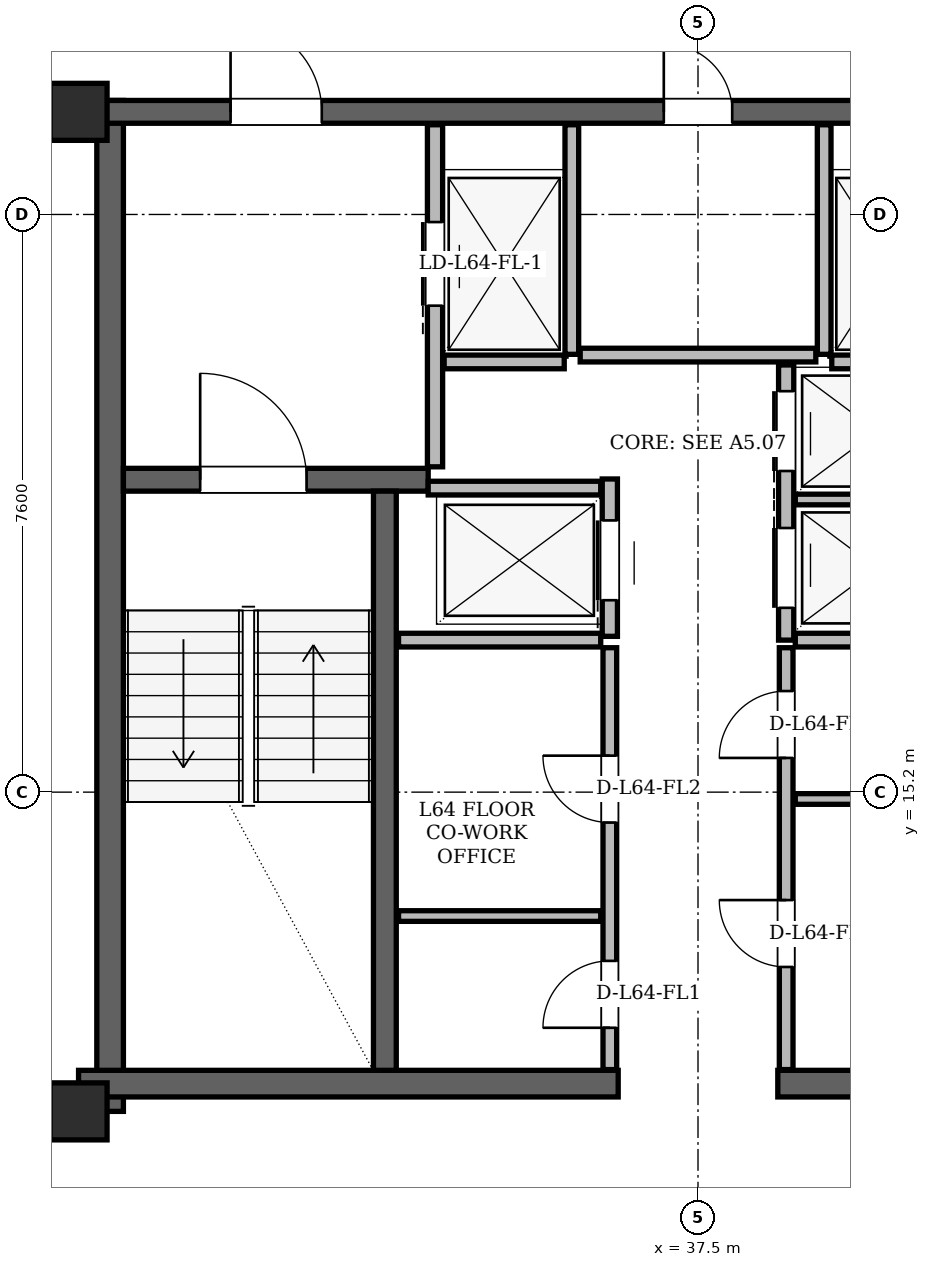
"""IFC4 building model, lengths in metres.
Left out: names, types, materials, properties, quantities, classifications, styles, units other than length and angle.
Written with IfcOpenShell. Run it as: python <this file> out.ifc"""

import sys

from ifc_helpers import new_model, si_unit, direction, frame, frame_2d, origin, origin_2d, place, context, subcontext, project, spatial, rectangle, hollow_rectangle, extrude, element, fill, save


model = new_model("IFC4")
c1 = context("Model", 3, precision=1e-05, world=origin(), true_north=direction((0.0, 1.0)))
c2 = subcontext(c1, "Body", "Model", "MODEL_VIEW")
j1 = project(units=[si_unit("LENGTHUNIT", "METRE"), si_unit("PLANEANGLEUNIT", "RADIAN")], contexts=[c1])
p1 = place(None, origin())
s1 = spatial("IfcSite", under=j1, at=p1, CompositionType="ELEMENT")
p2 = place(p1, origin())
s2 = spatial("IfcBuilding", under=s1, at=p2, CompositionType="ELEMENT")
p3 = place(p2, frame((0.0, 0.0, 241.5)))
s3 = spatial("IfcBuildingStorey", under=s2, at=p3, CompositionType="ELEMENT", Elevation=241.5)
for number, where, z_axis, x_axis in (
    (1, (29.35, 11.0, 0.0), (0.0, 0.0, 1.0), (1.0, 0.0, 0.0)),
    (2, (29.35, 24.15, 0.0), (0.0, 0.0, 1.0), (1.0, 0.0, 0.0)),
):
    element("IfcColumn", number, at=place(p3, frame(where, z_axis=z_axis, x_axis=x_axis)), inside=s3, PredefinedType="COLUMN", context=c2, shape_type="SweptSolid", body=[
        extrude(hollow_rectangle(XDim=0.75, YDim=0.75, WallThickness=0.06, at=origin_2d()), origin(), (0.0, 0.0, 1.0), 3.6),
    ])
p4 = place(p3, frame((29.765, 11.0, 0.0), z_axis=(0.0, 0.0, 1.0), x_axis=(0.0, 1.0, 0.0)))
e3 = element("IfcWall", 3, at=p4, inside=s3, PredefinedType="SHEAR", context=c2, shape_type="SweptSolid", body=[
    extrude(rectangle(XDim=13.3, YDim=0.35, at=frame_2d((6.65, 0.0))), origin(), (0.0, 0.0, 1.0), 3.34),
])
for number, where, z_axis, x_axis in (
    (4, (29.35, 11.365, 0.0), (0.0, 0.0, 1.0), (1.0, 0.0, 0.0)),
    (5, (38.55, 11.365, 0.0), (0.0, 0.0, 1.0), (1.0, 0.0, 0.0)),
):
    element("IfcWall", number, at=place(p3, frame(where, z_axis=z_axis, x_axis=x_axis)), inside=s3, PredefinedType="SHEAR", context=c2, shape_type="SweptSolid", body=[
        extrude(rectangle(XDim=7.1, YDim=0.35, at=frame_2d((3.55, 0.0))), origin(), (0.0, 0.0, 1.0), 3.34),
    ])
p5 = place(p3, frame((29.65, 24.15, 0.0), z_axis=(0.0, 0.0, 1.0), x_axis=(1.0, 0.0, 0.0)))
e6 = element("IfcWall", 6, at=p5, inside=s3, PredefinedType="SHEAR", context=c2, shape_type="SweptSolid", body=[
    extrude(rectangle(XDim=15.7, YDim=0.3, at=frame_2d((7.85, 0.0))), origin(), (0.0, 0.0, 1.0), 3.34),
])
p6 = place(p5, frame((1.7, 0.0, 0.0)))
e7 = element("IfcOpeningElement", 7, at=p6, cuts=e6, PredefinedType="OPENING", context=c2, shape_type="SweptSolid", body=[
    extrude(rectangle(XDim=1.2, YDim=2.2, at=frame_2d((0.6, 1.1))), frame((0.0, 0.15, 0.0), z_axis=(0.0, -1.0, 0.0), x_axis=(1.0, 0.0, 0.0)), (0.0, 0.0, 1.0), 0.3),
])
p7 = place(p5, frame((12.8, 0.0, 0.0)))
e8 = element("IfcOpeningElement", 8, at=p7, cuts=e6, PredefinedType="OPENING", context=c2, shape_type="SweptSolid", body=[
    extrude(rectangle(XDim=1.2, YDim=2.2, at=frame_2d((0.6, 1.1))), frame((0.0, 0.15, 0.0), z_axis=(0.0, -1.0, 0.0), x_axis=(1.0, 0.0, 0.0)), (0.0, 0.0, 1.0), 0.3),
])
p8 = place(p5, frame((7.4, 0.0, 0.0)))
e9 = element("IfcOpeningElement", 9, at=p8, cuts=e6, PredefinedType="OPENING", context=c2, shape_type="SweptSolid", body=[
    extrude(rectangle(XDim=0.9, YDim=2.05, at=frame_2d((0.45, 1.025))), frame((0.0, 0.15, 0.0), z_axis=(0.0, -1.0, 0.0), x_axis=(1.0, 0.0, 0.0)), (0.0, 0.0, 1.0), 0.3),
])
p9 = place(p3, frame((29.94, 19.31, 0.0), z_axis=(0.0, 0.0, 1.0), x_axis=(1.0, 0.0, 0.0)))
e10 = element("IfcWall", 10, at=p9, inside=s3, PredefinedType="SHEAR", context=c2, shape_type="SweptSolid", body=[
    extrude(rectangle(XDim=4.01, YDim=0.3, at=frame_2d((2.005, 0.0))), origin(), (0.0, 0.0, 1.0), 3.34),
])
p10 = place(p9, frame((1.01, 0.0, 0.0)))
e11 = element("IfcOpeningElement", 11, at=p10, cuts=e10, PredefinedType="OPENING", context=c2, shape_type="SweptSolid", body=[
    extrude(rectangle(XDim=1.4, YDim=2.2, at=frame_2d((0.7, 1.1))), frame((0.0, 0.15, 0.0), z_axis=(0.0, -1.0, 0.0), x_axis=(1.0, 0.0, 0.0)), (0.0, 0.0, 1.0), 0.3),
])
p11 = place(p3, frame((33.38, 11.54, 0.0), z_axis=(0.0, 0.0, 1.0), x_axis=(0.0, 1.0, 0.0)))
e12 = element("IfcWall", 12, at=p11, inside=s3, PredefinedType="SHEAR", context=c2, shape_type="SweptSolid", body=[
    extrude(rectangle(XDim=7.62, YDim=0.3, at=frame_2d((3.81, 0.0))), origin(), (0.0, 0.0, 1.0), 3.34),
])
p12 = place(p3, frame((34.618, 43.098, 0.0), z_axis=(0.0, 0.0, 1.0), x_axis=(-0.499999075663, -0.86602593745, 0.0)))
e13 = element("IfcWall", 13, at=p12, inside=s3, PredefinedType="SOLIDWALL", context=c2, shape_type="SweptSolid", body=[
    extrude(rectangle(XDim=36.951, YDim=0.29, at=frame_2d((18.476, 0.0))), origin(), (0.0, 0.0, 1.0), 2.637),
])
p13 = place(p12, frame((8.244, 0.0, 0.0)))
e14 = element("IfcOpeningElement", 14, at=p13, cuts=e13, PredefinedType="OPENING", context=c2, shape_type="SweptSolid", body=[
    extrude(rectangle(XDim=1.5, YDim=2.2, at=frame_2d((0.75, 1.1))), frame((0.0, 0.145, 0.0), z_axis=(0.0, -1.0, 0.0), x_axis=(1.0, 0.0, 0.0)), (0.0, 0.0, 1.0), 0.29),
])
p14 = place(p12, frame((32.022, 0.0, 0.0)))
e15 = element("IfcOpeningElement", 15, at=p14, cuts=e13, PredefinedType="OPENING", context=c2, shape_type="SweptSolid", body=[
    extrude(rectangle(XDim=1.5, YDim=2.2, at=frame_2d((0.75, 1.1))), frame((0.0, 0.145, 0.0), z_axis=(0.0, -1.0, 0.0), x_axis=(1.0, 0.0, 0.0)), (0.0, 0.0, 1.0), 0.29),
])
p15 = place(p12, frame((21.911, 0.0, 0.85)))
e16 = element("IfcOpeningElement", 16, at=p15, cuts=e13, PredefinedType="OPENING", context=c2, shape_type="SweptSolid", body=[
    extrude(rectangle(XDim=2.4, YDim=1.677, at=frame_2d((1.2, 0.838))), frame((0.0, 0.145, 0.0), z_axis=(0.0, -1.0, 0.0), x_axis=(1.0, 0.0, 0.0)), (0.0, 0.0, 1.0), 0.29),
])
p16 = place(p12, frame((28.29, 0.0, 0.85)))
e17 = element("IfcOpeningElement", 17, at=p16, cuts=e13, PredefinedType="OPENING", context=c2, shape_type="SweptSolid", body=[
    extrude(rectangle(XDim=1.2, YDim=1.48, at=frame_2d((0.6, 0.74))), frame((0.0, 0.145, 0.0), z_axis=(0.0, -1.0, 0.0), x_axis=(1.0, 0.0, 0.0)), (0.0, 0.0, 1.0), 0.29),
])
p17 = place(p12, frame((34.755, 0.0, 0.85)))
e18 = element("IfcOpeningElement", 18, at=p17, cuts=e13, PredefinedType="OPENING", context=c2, shape_type="SweptSolid", body=[
    extrude(rectangle(XDim=1.2, YDim=1.48, at=frame_2d((0.6, 0.74))), frame((0.0, 0.145, 0.0), z_axis=(0.0, -1.0, 0.0), x_axis=(1.0, 0.0, 0.0)), (0.0, 0.0, 1.0), 0.29),
])
p18 = place(p12, frame((12.233, 0.0, 0.85)))
e19 = element("IfcOpeningElement", 19, at=p18, cuts=e13, PredefinedType="OPENING", context=c2, shape_type="SweptSolid", body=[
    extrude(rectangle(XDim=1.2, YDim=1.48, at=frame_2d((0.6, 0.74))), frame((0.0, 0.145, 0.0), z_axis=(0.0, -1.0, 0.0), x_axis=(1.0, 0.0, 0.0)), (0.0, 0.0, 1.0), 0.29),
])
p19 = place(p12, frame((16.59, 0.0, 0.85)))
e20 = element("IfcOpeningElement", 20, at=p19, cuts=e13, PredefinedType="OPENING", context=c2, shape_type="SweptSolid", body=[
    extrude(rectangle(XDim=2.0, YDim=1.677, at=frame_2d((1.0, 0.838))), frame((0.0, 0.145, 0.0), z_axis=(0.0, -1.0, 0.0), x_axis=(1.0, 0.0, 0.0)), (0.0, 0.0, 1.0), 0.29),
])
p20 = place(p12, frame((3.092, 0.0, 0.85)))
e21 = element("IfcOpeningElement", 21, at=p20, cuts=e13, PredefinedType="OPENING", context=c2, shape_type="SweptSolid", body=[
    extrude(rectangle(XDim=1.2, YDim=1.48, at=frame_2d((0.6, 0.74))), frame((0.0, 0.145, 0.0), z_axis=(0.0, -1.0, 0.0), x_axis=(1.0, 0.0, 0.0)), (0.0, 0.0, 1.0), 0.29),
])
p21 = place(p3, frame((34.04, 19.48, 0.0), z_axis=(0.0, 0.0, 1.0), x_axis=(0.0, 1.0, 0.0)))
e22 = element("IfcWall", 22, at=p21, inside=s3, PredefinedType="PARTITIONING", context=c2, shape_type="SweptSolid", body=[
    extrude(rectangle(XDim=4.5, YDim=0.2, at=frame_2d((2.25, 0.0))), origin(), (0.0, 0.0, 1.0), 3.34),
])
p22 = place(p21, frame((2.12, 0.0, 0.0)))
e23 = element("IfcOpeningElement", 23, at=p22, cuts=e22, PredefinedType="OPENING", context=c2, shape_type="SweptSolid", body=[
    extrude(rectangle(XDim=1.1, YDim=2.2, at=frame_2d((0.55, 1.1))), frame((0.0, 0.1, 0.0), z_axis=(0.0, -1.0, 0.0), x_axis=(1.0, 0.0, 0.0)), (0.0, 0.0, 1.0), 0.2),
])
p23 = place(p3, frame((35.84, 20.96, 0.0), z_axis=(0.0, 0.0, 1.0), x_axis=(0.0, 1.0, 0.0)))
e24 = element("IfcWall", 24, at=p23, inside=s3, PredefinedType="PARTITIONING", context=c2, shape_type="SweptSolid", body=[
    extrude(rectangle(XDim=3.02, YDim=0.18, at=frame_2d((1.51, 0.0))), origin(), (0.0, 0.0, 1.0), 3.34),
])
p24 = place(p3, frame((34.16, 20.86, 0.0), z_axis=(0.0, 0.0, 1.0), x_axis=(1.0, 0.0, 0.0)))
e25 = element("IfcWall", 25, at=p24, inside=s3, PredefinedType="PARTITIONING", context=c2, shape_type="SweptSolid", body=[
    extrude(rectangle(XDim=1.58, YDim=0.18, at=frame_2d((0.79, 0.0))), origin(), (0.0, 0.0, 1.0), 3.34),
])
p25 = place(p3, frame((39.16, 20.96, 0.0), z_axis=(0.0, 0.0, 1.0), x_axis=(0.0, 1.0, 0.0)))
e26 = element("IfcWall", 26, at=p25, inside=s3, PredefinedType="PARTITIONING", context=c2, shape_type="SweptSolid", body=[
    extrude(rectangle(XDim=3.02, YDim=0.18, at=frame_2d((1.51, 0.0))), origin(), (0.0, 0.0, 1.0), 3.34),
])
p26 = place(p3, frame((39.26, 20.86, 0.0), z_axis=(0.0, 0.0, 1.0), x_axis=(1.0, 0.0, 0.0)))
e27 = element("IfcWall", 27, at=p26, inside=s3, PredefinedType="PARTITIONING", context=c2, shape_type="SweptSolid", body=[
    extrude(rectangle(XDim=1.58, YDim=0.18, at=frame_2d((0.79, 0.0))), origin(), (0.0, 0.0, 1.0), 3.34),
])
p27 = place(p3, frame((36.34, 17.25, 0.0), z_axis=(0.0, 0.0, 1.0), x_axis=(0.0, 1.0, 0.0)))
e28 = element("IfcWall", 28, at=p27, inside=s3, PredefinedType="PARTITIONING", context=c2, shape_type="SweptSolid", body=[
    extrude(rectangle(XDim=2.07, YDim=0.2, at=frame_2d((1.035, 0.0))), origin(), (0.0, 0.0, 1.0), 3.34),
])
p28 = place(p27, frame((0.475, 0.0, 0.0)))
e29 = element("IfcOpeningElement", 29, at=p28, cuts=e28, PredefinedType="OPENING", context=c2, shape_type="SweptSolid", body=[
    extrude(rectangle(XDim=1.05, YDim=2.15, at=frame_2d((0.525, 1.075))), frame((0.0, 0.1, 0.0), z_axis=(0.0, -1.0, 0.0), x_axis=(1.0, 0.0, 0.0)), (0.0, 0.0, 1.0), 0.2),
])
p29 = place(p3, frame((33.95, 19.2, 0.0), z_axis=(0.0, 0.0, 1.0), x_axis=(1.0, 0.0, 0.0)))
e30 = element("IfcWall", 30, at=p29, inside=s3, PredefinedType="PARTITIONING", context=c2, shape_type="SweptSolid", body=[
    extrude(rectangle(XDim=2.27, YDim=0.18, at=frame_2d((1.135, 0.0))), origin(), (0.0, 0.0, 1.0), 3.34),
])
p30 = place(p3, frame((33.56, 17.2, 0.0), z_axis=(0.0, 0.0, 1.0), x_axis=(1.0, 0.0, 0.0)))
e31 = element("IfcWall", 31, at=p30, inside=s3, PredefinedType="PARTITIONING", context=c2, shape_type="SweptSolid", body=[
    extrude(rectangle(XDim=2.66, YDim=0.18, at=frame_2d((1.33, 0.0))), origin(), (0.0, 0.0, 1.0), 3.34),
])
p31 = place(p3, frame((36.34, 11.55, 0.0), z_axis=(0.0, 0.0, 1.0), x_axis=(0.0, 1.0, 0.0)))
e32 = element("IfcWall", 32, at=p31, inside=s3, PredefinedType="PARTITIONING", context=c2, shape_type="SweptSolid", body=[
    extrude(rectangle(XDim=5.55, YDim=0.18, at=frame_2d((2.775, 0.0))), origin(), (0.0, 0.0, 1.0), 3.34),
])
p32 = place(p31, frame((0.55, 0.0, 0.0)))
e33 = element("IfcOpeningElement", 33, at=p32, cuts=e32, PredefinedType="OPENING", context=c2, shape_type="SweptSolid", body=[
    extrude(rectangle(XDim=0.88, YDim=2.08, at=frame_2d((0.44, 1.04))), frame((0.0, 0.09, 0.0), z_axis=(0.0, -1.0, 0.0), x_axis=(1.0, 0.0, 0.0)), (0.0, 0.0, 1.0), 0.18),
])
p33 = place(p31, frame((3.25, 0.0, 0.0)))
e34 = element("IfcOpeningElement", 34, at=p33, cuts=e32, PredefinedType="OPENING", context=c2, shape_type="SweptSolid", body=[
    extrude(rectangle(XDim=0.88, YDim=2.08, at=frame_2d((0.44, 1.04))), frame((0.0, 0.09, 0.0), z_axis=(0.0, -1.0, 0.0), x_axis=(1.0, 0.0, 0.0)), (0.0, 0.0, 1.0), 0.18),
])
p34 = place(p3, frame((33.56, 13.57, 0.0), z_axis=(0.0, 0.0, 1.0), x_axis=(1.0, 0.0, 0.0)))
e35 = element("IfcWall", 35, at=p34, inside=s3, PredefinedType="PARTITIONING", context=c2, shape_type="SweptSolid", body=[
    extrude(rectangle(XDim=2.66, YDim=0.14, at=frame_2d((1.33, 0.0))), origin(), (0.0, 0.0, 1.0), 3.34),
])
p35 = place(p3, frame((38.66, 17.2, 0.0), z_axis=(0.0, 0.0, 1.0), x_axis=(0.0, 1.0, 0.0)))
e36 = element("IfcWall", 36, at=p35, inside=s3, PredefinedType="PARTITIONING", context=c2, shape_type="SweptSolid", body=[
    extrude(rectangle(XDim=3.62, YDim=0.2, at=frame_2d((1.81, 0.0))), origin(), (0.0, 0.0, 1.0), 3.34),
])
p36 = place(p35, frame((0.425, 0.0, 0.0)))
e37 = element("IfcOpeningElement", 37, at=p36, cuts=e36, PredefinedType="OPENING", context=c2, shape_type="SweptSolid", body=[
    extrude(rectangle(XDim=1.05, YDim=2.15, at=frame_2d((0.525, 1.075))), frame((0.0, 0.1, 0.0), z_axis=(0.0, -1.0, 0.0), x_axis=(1.0, 0.0, 0.0)), (0.0, 0.0, 1.0), 0.2),
])
p37 = place(p35, frame((2.225, 0.0, 0.0)))
e38 = element("IfcOpeningElement", 38, at=p37, cuts=e36, PredefinedType="OPENING", context=c2, shape_type="SweptSolid", body=[
    extrude(rectangle(XDim=1.05, YDim=2.15, at=frame_2d((0.525, 1.075))), frame((0.0, 0.1, 0.0), z_axis=(0.0, -1.0, 0.0), x_axis=(1.0, 0.0, 0.0)), (0.0, 0.0, 1.0), 0.2),
])
p38 = place(p3, frame((38.78, 17.2, 0.0), z_axis=(0.0, 0.0, 1.0), x_axis=(1.0, 0.0, 0.0)))
e39 = element("IfcWall", 39, at=p38, inside=s3, PredefinedType="PARTITIONING", context=c2, shape_type="SweptSolid", body=[
    extrude(rectangle(XDim=2.66, YDim=0.18, at=frame_2d((1.33, 0.0))), origin(), (0.0, 0.0, 1.0), 3.34),
])
p39 = place(p3, frame((38.78, 19.05, 0.0), z_axis=(0.0, 0.0, 1.0), x_axis=(1.0, 0.0, 0.0)))
e40 = element("IfcWall", 40, at=p39, inside=s3, PredefinedType="PARTITIONING", context=c2, shape_type="SweptSolid", body=[
    extrude(rectangle(XDim=2.66, YDim=0.14, at=frame_2d((1.33, 0.0))), origin(), (0.0, 0.0, 1.0), 3.34),
])
p40 = place(p3, frame((38.66, 11.55, 0.0), z_axis=(0.0, 0.0, 1.0), x_axis=(0.0, 1.0, 0.0)))
e41 = element("IfcWall", 41, at=p40, inside=s3, PredefinedType="PARTITIONING", context=c2, shape_type="SweptSolid", body=[
    extrude(rectangle(XDim=5.55, YDim=0.18, at=frame_2d((2.775, 0.0))), origin(), (0.0, 0.0, 1.0), 3.34),
])
p41 = place(p40, frame((1.35, 0.0, 0.0)))
e42 = element("IfcOpeningElement", 42, at=p41, cuts=e41, PredefinedType="OPENING", context=c2, shape_type="SweptSolid", body=[
    extrude(rectangle(XDim=0.88, YDim=2.08, at=frame_2d((0.44, 1.04))), frame((0.0, 0.09, 0.0), z_axis=(0.0, -1.0, 0.0), x_axis=(1.0, 0.0, 0.0)), (0.0, 0.0, 1.0), 0.18),
])
p42 = place(p40, frame((4.1, 0.0, 0.0)))
e43 = element("IfcOpeningElement", 43, at=p42, cuts=e41, PredefinedType="OPENING", context=c2, shape_type="SweptSolid", body=[
    extrude(rectangle(XDim=0.88, YDim=2.08, at=frame_2d((0.44, 1.04))), frame((0.0, 0.09, 0.0), z_axis=(0.0, -1.0, 0.0), x_axis=(1.0, 0.0, 0.0)), (0.0, 0.0, 1.0), 0.18),
])
p43 = place(p3, frame((38.78, 15.11, 0.0), z_axis=(0.0, 0.0, 1.0), x_axis=(1.0, 0.0, 0.0)))
e44 = element("IfcWall", 44, at=p43, inside=s3, PredefinedType="PARTITIONING", context=c2, shape_type="SweptSolid", body=[
    extrude(rectangle(XDim=2.66, YDim=0.14, at=frame_2d((1.33, 0.0))), origin(), (0.0, 0.0, 1.0), 3.34),
])
p44 = place(p3, frame((35.95, 20.95, 0.0), z_axis=(0.0, 0.0, 1.0), x_axis=(1.0, 0.0, 0.0)))
e45 = element("IfcWall", 45, at=p44, inside=s3, PredefinedType="PARTITIONING", context=c2, shape_type="SweptSolid", body=[
    extrude(rectangle(XDim=3.1, YDim=0.18, at=frame_2d((1.55, 0.0))), origin(), (0.0, 0.0, 1.0), 3.34),
])
p45 = place(p32, origin())
e46 = element("IfcDoor", 46, at=p45, inside=s3, OperationType="SINGLE_SWING_LEFT", PredefinedType="DOOR", context=c2, shape_type="SweptSolid", body=[
    extrude(rectangle(XDim=0.88, YDim=2.08, at=frame_2d((0.44, 1.04))), frame((0.0, 0.025, 0.0), z_axis=(0.0, -1.0, 0.0), x_axis=(1.0, 0.0, 0.0)), (0.0, 0.0, 1.0), 0.05),
])
fill(e33, e46)
p46 = place(p33, origin())
e47 = element("IfcDoor", 47, at=p46, inside=s3, OperationType="SINGLE_SWING_RIGHT", PredefinedType="DOOR", context=c2, shape_type="SweptSolid", body=[
    extrude(rectangle(XDim=0.88, YDim=2.08, at=frame_2d((0.44, 1.04))), frame((0.0, 0.025, 0.0), z_axis=(0.0, -1.0, 0.0), x_axis=(1.0, 0.0, 0.0)), (0.0, 0.0, 1.0), 0.05),
])
fill(e34, e47)
p47 = place(p41, origin())
e48 = element("IfcDoor", 48, at=p47, inside=s3, OperationType="SINGLE_SWING_RIGHT", PredefinedType="DOOR", context=c2, shape_type="SweptSolid", body=[
    extrude(rectangle(XDim=0.88, YDim=2.08, at=frame_2d((0.44, 1.04))), frame((0.0, 0.025, 0.0), z_axis=(0.0, -1.0, 0.0), x_axis=(1.0, 0.0, 0.0)), (0.0, 0.0, 1.0), 0.05),
])
fill(e42, e48)
p48 = place(p42, origin())
e49 = element("IfcDoor", 49, at=p48, inside=s3, OperationType="SINGLE_SWING_LEFT", PredefinedType="DOOR", context=c2, shape_type="SweptSolid", body=[
    extrude(rectangle(XDim=0.88, YDim=2.08, at=frame_2d((0.44, 1.04))), frame((0.0, 0.025, 0.0), z_axis=(0.0, -1.0, 0.0), x_axis=(1.0, 0.0, 0.0)), (0.0, 0.0, 1.0), 0.05),
])
fill(e43, e49)
p49 = place(p22, origin())
e50 = element("IfcDoor", 50, at=p49, inside=s3, OperationType="SLIDING_TO_LEFT", PredefinedType="DOOR", context=c2, shape_type="SweptSolid", body=[
    extrude(rectangle(XDim=1.1, YDim=2.2, at=frame_2d((0.55, 1.1))), frame((0.0, 0.025, 0.0), z_axis=(0.0, -1.0, 0.0), x_axis=(1.0, 0.0, 0.0)), (0.0, 0.0, 1.0), 0.05),
])
fill(e23, e50)
p50 = place(p28, origin())
e51 = element("IfcDoor", 51, at=p50, inside=s3, OperationType="SLIDING_TO_LEFT", PredefinedType="DOOR", context=c2, shape_type="SweptSolid", body=[
    extrude(rectangle(XDim=1.05, YDim=2.15, at=frame_2d((0.525, 1.075))), frame((0.0, 0.025, 0.0), z_axis=(0.0, -1.0, 0.0), x_axis=(1.0, 0.0, 0.0)), (0.0, 0.0, 1.0), 0.05),
])
fill(e29, e51)
p51 = place(p36, origin())
e52 = element("IfcDoor", 52, at=p51, inside=s3, OperationType="SLIDING_TO_RIGHT", PredefinedType="DOOR", context=c2, shape_type="SweptSolid", body=[
    extrude(rectangle(XDim=1.05, YDim=2.15, at=frame_2d((0.525, 1.075))), frame((0.0, 0.025, 0.0), z_axis=(0.0, -1.0, 0.0), x_axis=(1.0, 0.0, 0.0)), (0.0, 0.0, 1.0), 0.05),
])
fill(e37, e52)
p52 = place(p37, origin())
e53 = element("IfcDoor", 53, at=p52, inside=s3, OperationType="SLIDING_TO_LEFT", PredefinedType="DOOR", context=c2, shape_type="SweptSolid", body=[
    extrude(rectangle(XDim=1.05, YDim=2.15, at=frame_2d((0.525, 1.075))), frame((0.0, 0.025, 0.0), z_axis=(0.0, -1.0, 0.0), x_axis=(1.0, 0.0, 0.0)), (0.0, 0.0, 1.0), 0.05),
])
fill(e38, e53)
p53 = place(p10, origin())
e54 = element("IfcDoor", 54, at=p53, inside=s3, OperationType="SINGLE_SWING_LEFT", PredefinedType="DOOR", context=c2, shape_type="SweptSolid", body=[
    extrude(rectangle(XDim=1.4, YDim=2.2, at=frame_2d((0.7, 1.1))), frame((0.0, 0.025, 0.0), z_axis=(0.0, -1.0, 0.0), x_axis=(1.0, 0.0, 0.0)), (0.0, 0.0, 1.0), 0.05),
])
fill(e11, e54)
p54 = place(p6, origin())
e55 = element("IfcDoor", 55, at=p54, inside=s3, OperationType="SINGLE_SWING_LEFT", PredefinedType="DOOR", context=c2, shape_type="SweptSolid", body=[
    extrude(rectangle(XDim=1.2, YDim=2.2, at=frame_2d((0.6, 1.1))), frame((0.0, 0.025, 0.0), z_axis=(0.0, -1.0, 0.0), x_axis=(1.0, 0.0, 0.0)), (0.0, 0.0, 1.0), 0.05),
])
fill(e7, e55)
p55 = place(p8, origin())
e56 = element("IfcDoor", 56, at=p55, inside=s3, OperationType="SINGLE_SWING_LEFT", PredefinedType="DOOR", context=c2, shape_type="SweptSolid", body=[
    extrude(rectangle(XDim=0.9, YDim=2.05, at=frame_2d((0.45, 1.025))), frame((0.0, 0.025, 0.0), z_axis=(0.0, -1.0, 0.0), x_axis=(1.0, 0.0, 0.0)), (0.0, 0.0, 1.0), 0.05),
])
fill(e9, e56)
save(model, sys.argv[1])
